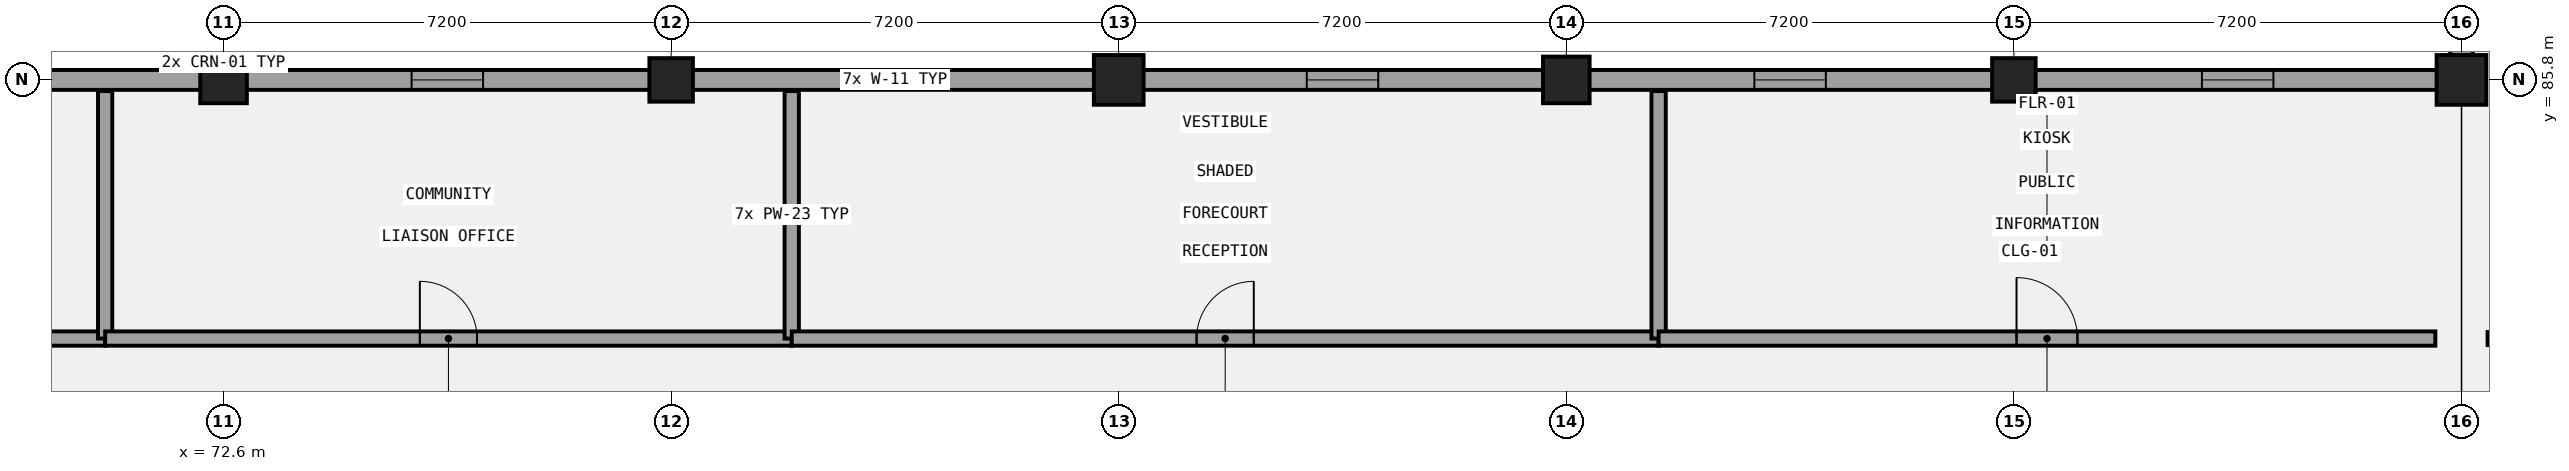
"""IFC4 building model, lengths in metres.
Left out: names, types, materials, properties, quantities, classifications, styles, units other than length and angle.
Written with IfcOpenShell. Run it as: python <this file> out.ifc"""

import sys

from ifc_helpers import new_model, si_unit, direction, frame, frame_2d, origin, origin_2d, place, context, subcontext, project, spatial, rectangle, extrude, element, fill, save


model = new_model("IFC4")
c1 = context("Model", 3, precision=1e-05, world=origin(), true_north=direction((0.0, 1.0)))
c2 = subcontext(c1, "Body", "Model", "MODEL_VIEW")
j1 = project(units=[si_unit("LENGTHUNIT", "METRE"), si_unit("PLANEANGLEUNIT", "RADIAN")], contexts=[c1])
p1 = place(None, origin())
s1 = spatial("IfcSite", under=j1, at=p1, CompositionType="ELEMENT")
p2 = place(p1, origin())
s2 = spatial("IfcBuilding", under=s1, at=p2, CompositionType="ELEMENT")
p3 = place(p2, origin())
s3 = spatial("IfcBuildingStorey", under=s2, at=p3, CompositionType="ELEMENT", Elevation=0.0)
p4 = place(p3, frame((72.6, 85.8, 0.0), z_axis=(0.0, 0.0, 1.0), x_axis=(1.0, 0.0, 0.0)))
e1 = element("IfcColumn", 1, at=p4, inside=s3, PredefinedType="COLUMN", context=c2, shape_type="SweptSolid", body=[
    extrude(rectangle(XDim=0.75, YDim=0.75, at=origin_2d()), origin(), (0.0, 0.0, 1.0), 5.4),
])
p5 = place(p3, frame((79.8, 85.8, 0.0), z_axis=(0.0, 0.0, 1.0), x_axis=(1.0, 0.0, 0.0)))
e2 = element("IfcColumn", 2, at=p5, inside=s3, PredefinedType="COLUMN", context=c2, shape_type="SweptSolid", body=[
    extrude(rectangle(XDim=0.7, YDim=0.7, at=origin_2d()), origin(), (0.0, 0.0, 1.0), 5.4),
])
p6 = place(p3, frame((87.0, 85.8, 0.0), z_axis=(0.0, 0.0, 1.0), x_axis=(1.0, 0.0, 0.0)))
e3 = element("IfcColumn", 3, at=p6, inside=s3, PredefinedType="COLUMN", context=c2, shape_type="SweptSolid", body=[
    extrude(rectangle(XDim=0.8, YDim=0.8, at=origin_2d()), origin(), (0.0, 0.0, 1.0), 5.4),
])
p7 = place(p3, frame((94.2, 85.8, 0.0), z_axis=(0.0, 0.0, 1.0), x_axis=(1.0, 0.0, 0.0)))
e4 = element("IfcColumn", 4, at=p7, inside=s3, PredefinedType="COLUMN", context=c2, shape_type="SweptSolid", body=[
    extrude(rectangle(XDim=0.75, YDim=0.75, at=origin_2d()), origin(), (0.0, 0.0, 1.0), 5.4),
])
p8 = place(p3, frame((101.4, 85.8, 0.0), z_axis=(0.0, 0.0, 1.0), x_axis=(1.0, 0.0, 0.0)))
e5 = element("IfcColumn", 5, at=p8, inside=s3, PredefinedType="COLUMN", context=c2, shape_type="SweptSolid", body=[
    extrude(rectangle(XDim=0.7, YDim=0.7, at=origin_2d()), origin(), (0.0, 0.0, 1.0), 5.4),
])
p9 = place(p3, frame((108.6, 85.8, 0.0), z_axis=(0.0, 0.0, 1.0), x_axis=(1.0, 0.0, 0.0)))
e6 = element("IfcColumn", 6, at=p9, inside=s3, PredefinedType="COLUMN", context=c2, shape_type="SweptSolid", body=[
    extrude(rectangle(XDim=0.8, YDim=0.8, at=origin_2d()), origin(), (0.0, 0.0, 1.0), 5.4),
])
p10 = place(p3, frame((108.6, 92.75, 0.0), z_axis=(0.0, 0.0, 1.0), x_axis=(0.0, -1.0, 0.0)))
e7 = element("IfcWall", 7, at=p10, inside=s3, PredefinedType="SOLIDWALL", context=c2, shape_type="SweptSolid", body=[
    extrude(rectangle(XDim=6.77, YDim=0.36, at=frame_2d((3.385, 0.0))), origin(), (0.0, 0.0, 1.0), 4.32),
])
p11 = place(p10, frame((2.96, 0.0, 0.95)))
e8 = element("IfcOpeningElement", 8, at=p11, cuts=e7, PredefinedType="OPENING", context=c2, shape_type="SweptSolid", body=[
    extrude(rectangle(XDim=0.85, YDim=1.4, at=frame_2d((0.425, 0.7))), frame((0.0, 0.19, 0.0), z_axis=(0.0, -1.0, 0.0), x_axis=(1.0, 0.0, 0.0)), (0.0, 0.0, 1.0), 0.38),
])
p12 = place(p3, frame((108.76, 85.8, 0.0), z_axis=(0.0, 0.0, 1.0), x_axis=(-1.0, 0.0, 0.0)))
e9 = element("IfcWall", 9, at=p12, inside=s3, PredefinedType="SOLIDWALL", context=c2, shape_type="SweptSolid", body=[
    extrude(rectangle(XDim=72.32, YDim=0.32, at=frame_2d((36.16, 0.0))), origin(), (0.0, 0.0, 1.0), 4.12),
])
p13 = place(p12, frame((67.985, 0.0, 1.0)))
e10 = element("IfcOpeningElement", 10, at=p13, cuts=e9, PredefinedType="OPENING", context=c2, shape_type="SweptSolid", body=[
    extrude(rectangle(XDim=1.15, YDim=1.4, at=frame_2d((0.575, 0.7))), frame((0.0, 0.17, 0.0), z_axis=(0.0, -1.0, 0.0), x_axis=(1.0, 0.0, 0.0)), (0.0, 0.0, 1.0), 0.34),
])
p14 = place(p12, frame((60.785, 0.0, 1.0)))
e11 = element("IfcOpeningElement", 11, at=p14, cuts=e9, PredefinedType="OPENING", context=c2, shape_type="SweptSolid", body=[
    extrude(rectangle(XDim=1.15, YDim=1.4, at=frame_2d((0.575, 0.7))), frame((0.0, 0.17, 0.0), z_axis=(0.0, -1.0, 0.0), x_axis=(1.0, 0.0, 0.0)), (0.0, 0.0, 1.0), 0.34),
])
p15 = place(p12, frame((53.585, 0.0, 1.0)))
e12 = element("IfcOpeningElement", 12, at=p15, cuts=e9, PredefinedType="OPENING", context=c2, shape_type="SweptSolid", body=[
    extrude(rectangle(XDim=1.15, YDim=1.4, at=frame_2d((0.575, 0.7))), frame((0.0, 0.17, 0.0), z_axis=(0.0, -1.0, 0.0), x_axis=(1.0, 0.0, 0.0)), (0.0, 0.0, 1.0), 0.34),
])
p16 = place(p12, frame((46.385, 0.0, 1.0)))
e13 = element("IfcOpeningElement", 13, at=p16, cuts=e9, PredefinedType="OPENING", context=c2, shape_type="SweptSolid", body=[
    extrude(rectangle(XDim=1.15, YDim=1.4, at=frame_2d((0.575, 0.7))), frame((0.0, 0.17, 0.0), z_axis=(0.0, -1.0, 0.0), x_axis=(1.0, 0.0, 0.0)), (0.0, 0.0, 1.0), 0.34),
])
p17 = place(p12, frame((39.185, 0.0, 1.0)))
e14 = element("IfcOpeningElement", 14, at=p17, cuts=e9, PredefinedType="OPENING", context=c2, shape_type="SweptSolid", body=[
    extrude(rectangle(XDim=1.15, YDim=1.4, at=frame_2d((0.575, 0.7))), frame((0.0, 0.17, 0.0), z_axis=(0.0, -1.0, 0.0), x_axis=(1.0, 0.0, 0.0)), (0.0, 0.0, 1.0), 0.34),
])
p18 = place(p12, frame((31.985, 0.0, 1.0)))
e15 = element("IfcOpeningElement", 15, at=p18, cuts=e9, PredefinedType="OPENING", context=c2, shape_type="SweptSolid", body=[
    extrude(rectangle(XDim=1.15, YDim=1.4, at=frame_2d((0.575, 0.7))), frame((0.0, 0.17, 0.0), z_axis=(0.0, -1.0, 0.0), x_axis=(1.0, 0.0, 0.0)), (0.0, 0.0, 1.0), 0.34),
])
p19 = place(p12, frame((24.785, 0.0, 1.0)))
e16 = element("IfcOpeningElement", 16, at=p19, cuts=e9, PredefinedType="OPENING", context=c2, shape_type="SweptSolid", body=[
    extrude(rectangle(XDim=1.15, YDim=1.4, at=frame_2d((0.575, 0.7))), frame((0.0, 0.17, 0.0), z_axis=(0.0, -1.0, 0.0), x_axis=(1.0, 0.0, 0.0)), (0.0, 0.0, 1.0), 0.34),
])
p20 = place(p12, frame((17.585, 0.0, 1.0)))
e17 = element("IfcOpeningElement", 17, at=p20, cuts=e9, PredefinedType="OPENING", context=c2, shape_type="SweptSolid", body=[
    extrude(rectangle(XDim=1.15, YDim=1.4, at=frame_2d((0.575, 0.7))), frame((0.0, 0.17, 0.0), z_axis=(0.0, -1.0, 0.0), x_axis=(1.0, 0.0, 0.0)), (0.0, 0.0, 1.0), 0.34),
])
p21 = place(p12, frame((10.385, 0.0, 1.0)))
e18 = element("IfcOpeningElement", 18, at=p21, cuts=e9, PredefinedType="OPENING", context=c2, shape_type="SweptSolid", body=[
    extrude(rectangle(XDim=1.15, YDim=1.4, at=frame_2d((0.575, 0.7))), frame((0.0, 0.17, 0.0), z_axis=(0.0, -1.0, 0.0), x_axis=(1.0, 0.0, 0.0)), (0.0, 0.0, 1.0), 0.34),
])
p22 = place(p12, frame((3.185, 0.0, 1.0)))
e19 = element("IfcOpeningElement", 19, at=p22, cuts=e9, PredefinedType="OPENING", context=c2, shape_type="SweptSolid", body=[
    extrude(rectangle(XDim=1.15, YDim=1.4, at=frame_2d((0.575, 0.7))), frame((0.0, 0.17, 0.0), z_axis=(0.0, -1.0, 0.0), x_axis=(1.0, 0.0, 0.0)), (0.0, 0.0, 1.0), 0.34),
])
p23 = place(p3, frame((109.02, 81.64, 0.0), z_axis=(0.0, 0.0, 1.0), x_axis=(1.0, 0.0, 0.0)))
e20 = element("IfcWall", 20, at=p23, inside=s3, PredefinedType="PARTITIONING", context=c2, shape_type="SweptSolid", body=[
    extrude(rectangle(XDim=5.427, YDim=0.21, at=frame_2d((2.713, 0.0))), origin(), (0.0, 0.0, 1.0), 5.12),
])
p24 = place(p23, frame((2.033, 0.0, 0.0)))
e21 = element("IfcOpeningElement", 21, at=p24, cuts=e20, PredefinedType="OPENING", context=c2, shape_type="SweptSolid", body=[
    extrude(rectangle(XDim=1.36, YDim=2.35, at=frame_2d((0.68, 1.175))), frame((0.0, 0.115, 0.0), z_axis=(0.0, -1.0, 0.0), x_axis=(1.0, 0.0, 0.0)), (0.0, 0.0, 1.0), 0.23),
])
p25 = place(p3, frame((58.2, 81.64, 0.0), z_axis=(0.0, 0.0, 1.0), x_axis=(1.0, 0.0, 0.0)))
e22 = element("IfcWall", 22, at=p25, inside=s3, PredefinedType="PARTITIONING", context=c2, shape_type="SweptSolid", body=[
    extrude(rectangle(XDim=12.495, YDim=0.23, at=frame_2d((6.248, 0.0))), origin(), (0.0, 0.0, 1.0), 5.12),
])
p26 = place(p25, frame((5.788, 0.0, 0.0)))
e23 = element("IfcOpeningElement", 23, at=p26, cuts=e22, PredefinedType="OPENING", context=c2, shape_type="SweptSolid", body=[
    extrude(rectangle(XDim=0.92, YDim=2.1, at=frame_2d((0.46, 1.05))), frame((0.0, 0.125, 0.0), z_axis=(0.0, -1.0, 0.0), x_axis=(1.0, 0.0, 0.0)), (0.0, 0.0, 1.0), 0.25),
])
p27 = place(p3, frame((70.695, 81.64, 0.0), z_axis=(0.0, 0.0, 1.0), x_axis=(0.0, 1.0, 0.0)))
e24 = element("IfcWall", 24, at=p27, inside=s3, PredefinedType="PARTITIONING", context=c2, shape_type="SweptSolid", body=[
    extrude(rectangle(XDim=3.98, YDim=0.23, at=frame_2d((1.99, 0.0))), origin(), (0.0, 0.0, 1.0), 5.12),
])
p28 = place(p3, frame((70.695, 81.64, 0.0), z_axis=(0.0, 0.0, 1.0), x_axis=(1.0, 0.0, 0.0)))
e25 = element("IfcWall", 25, at=p28, inside=s3, PredefinedType="PARTITIONING", context=c2, shape_type="SweptSolid", body=[
    extrude(rectangle(XDim=11.045, YDim=0.23, at=frame_2d((5.522, 0.0))), origin(), (0.0, 0.0, 1.0), 5.12),
])
p29 = place(p28, frame((5.062, 0.0, 0.0)))
e26 = element("IfcOpeningElement", 26, at=p29, cuts=e25, PredefinedType="OPENING", context=c2, shape_type="SweptSolid", body=[
    extrude(rectangle(XDim=0.92, YDim=2.22, at=frame_2d((0.46, 1.11))), frame((0.0, 0.125, 0.0), z_axis=(0.0, -1.0, 0.0), x_axis=(1.0, 0.0, 0.0)), (0.0, 0.0, 1.0), 0.25),
])
p30 = place(p3, frame((81.74, 81.64, 0.0), z_axis=(0.0, 0.0, 1.0), x_axis=(0.0, 1.0, 0.0)))
e27 = element("IfcWall", 27, at=p30, inside=s3, PredefinedType="PARTITIONING", context=c2, shape_type="SweptSolid", body=[
    extrude(rectangle(XDim=3.98, YDim=0.23, at=frame_2d((1.99, 0.0))), origin(), (0.0, 0.0, 1.0), 5.12),
])
p31 = place(p3, frame((81.74, 81.64, 0.0), z_axis=(0.0, 0.0, 1.0), x_axis=(1.0, 0.0, 0.0)))
e28 = element("IfcWall", 28, at=p31, inside=s3, PredefinedType="PARTITIONING", context=c2, shape_type="SweptSolid", body=[
    extrude(rectangle(XDim=13.945, YDim=0.23, at=frame_2d((6.973, 0.0))), origin(), (0.0, 0.0, 1.0), 5.12),
])
p32 = place(p31, frame((6.512, 0.0, 0.0)))
e29 = element("IfcOpeningElement", 29, at=p32, cuts=e28, PredefinedType="OPENING", context=c2, shape_type="SweptSolid", body=[
    extrude(rectangle(XDim=0.92, YDim=2.35, at=frame_2d((0.46, 1.175))), frame((0.0, 0.125, 0.0), z_axis=(0.0, -1.0, 0.0), x_axis=(1.0, 0.0, 0.0)), (0.0, 0.0, 1.0), 0.25),
])
p33 = place(p3, frame((95.685, 81.64, 0.0), z_axis=(0.0, 0.0, 1.0), x_axis=(0.0, 1.0, 0.0)))
e30 = element("IfcWall", 30, at=p33, inside=s3, PredefinedType="PARTITIONING", context=c2, shape_type="SweptSolid", body=[
    extrude(rectangle(XDim=3.98, YDim=0.23, at=frame_2d((1.99, 0.0))), origin(), (0.0, 0.0, 1.0), 5.12),
])
p34 = place(p3, frame((95.685, 81.64, 0.0), z_axis=(0.0, 0.0, 1.0), x_axis=(1.0, 0.0, 0.0)))
e31 = element("IfcWall", 31, at=p34, inside=s3, PredefinedType="PARTITIONING", context=c2, shape_type="SweptSolid", body=[
    extrude(rectangle(XDim=12.495, YDim=0.23, at=frame_2d((6.248, 0.0))), origin(), (0.0, 0.0, 1.0), 5.12),
])
p35 = place(p34, frame((5.758, 0.0, 0.0)))
e32 = element("IfcOpeningElement", 32, at=p35, cuts=e31, PredefinedType="OPENING", context=c2, shape_type="SweptSolid", body=[
    extrude(rectangle(XDim=0.98, YDim=2.1, at=frame_2d((0.49, 1.05))), frame((0.0, 0.125, 0.0), z_axis=(0.0, -1.0, 0.0), x_axis=(1.0, 0.0, 0.0)), (0.0, 0.0, 1.0), 0.25),
])
p36 = place(p18, origin())
e33 = element("IfcWindow", 33, at=p36, inside=s3, PartitioningType="SINGLE_PANEL", PredefinedType="WINDOW", context=c2, shape_type="SweptSolid", body=[
    extrude(rectangle(XDim=1.15, YDim=1.4, at=frame_2d((0.575, 0.7))), frame((0.0, 0.03, 0.0), z_axis=(0.0, -1.0, 0.0), x_axis=(1.0, 0.0, 0.0)), (0.0, 0.0, 1.0), 0.06),
])
fill(e15, e33)
p37 = place(p19, origin())
e34 = element("IfcWindow", 34, at=p37, inside=s3, PartitioningType="SINGLE_PANEL", PredefinedType="WINDOW", context=c2, shape_type="SweptSolid", body=[
    extrude(rectangle(XDim=1.15, YDim=1.4, at=frame_2d((0.575, 0.7))), frame((0.0, 0.03, 0.0), z_axis=(0.0, -1.0, 0.0), x_axis=(1.0, 0.0, 0.0)), (0.0, 0.0, 1.0), 0.06),
])
fill(e16, e34)
p38 = place(p20, origin())
e35 = element("IfcWindow", 35, at=p38, inside=s3, PartitioningType="SINGLE_PANEL", PredefinedType="WINDOW", context=c2, shape_type="SweptSolid", body=[
    extrude(rectangle(XDim=1.15, YDim=1.4, at=frame_2d((0.575, 0.7))), frame((0.0, 0.03, 0.0), z_axis=(0.0, -1.0, 0.0), x_axis=(1.0, 0.0, 0.0)), (0.0, 0.0, 1.0), 0.06),
])
fill(e17, e35)
p39 = place(p21, origin())
e36 = element("IfcWindow", 36, at=p39, inside=s3, PartitioningType="SINGLE_PANEL", PredefinedType="WINDOW", context=c2, shape_type="SweptSolid", body=[
    extrude(rectangle(XDim=1.15, YDim=1.4, at=frame_2d((0.575, 0.7))), frame((0.0, 0.03, 0.0), z_axis=(0.0, -1.0, 0.0), x_axis=(1.0, 0.0, 0.0)), (0.0, 0.0, 1.0), 0.06),
])
fill(e18, e36)
p40 = place(p22, origin())
e37 = element("IfcWindow", 37, at=p40, inside=s3, PartitioningType="SINGLE_PANEL", PredefinedType="WINDOW", context=c2, shape_type="SweptSolid", body=[
    extrude(rectangle(XDim=1.15, YDim=1.4, at=frame_2d((0.575, 0.7))), frame((0.0, 0.03, 0.0), z_axis=(0.0, -1.0, 0.0), x_axis=(1.0, 0.0, 0.0)), (0.0, 0.0, 1.0), 0.06),
])
fill(e19, e37)
p41 = place(p29, origin())
e38 = element("IfcDoor", 38, at=p41, inside=s3, OperationType="SINGLE_SWING_LEFT", PredefinedType="DOOR", context=c2, shape_type="SweptSolid", body=[
    extrude(rectangle(XDim=0.92, YDim=2.22, at=frame_2d((0.46, 1.11))), frame((0.0, 0.025, 0.0), z_axis=(0.0, -1.0, 0.0), x_axis=(1.0, 0.0, 0.0)), (0.0, 0.0, 1.0), 0.05),
])
fill(e26, e38)
p42 = place(p32, origin())
e39 = element("IfcDoor", 39, at=p42, inside=s3, OperationType="SINGLE_SWING_RIGHT", PredefinedType="DOOR", context=c2, shape_type="SweptSolid", body=[
    extrude(rectangle(XDim=0.92, YDim=2.35, at=frame_2d((0.46, 1.175))), frame((0.0, 0.025, 0.0), z_axis=(0.0, -1.0, 0.0), x_axis=(1.0, 0.0, 0.0)), (0.0, 0.0, 1.0), 0.05),
])
fill(e29, e39)
p43 = place(p35, origin())
e40 = element("IfcDoor", 40, at=p43, inside=s3, OperationType="SINGLE_SWING_LEFT", PredefinedType="DOOR", context=c2, shape_type="SweptSolid", body=[
    extrude(rectangle(XDim=0.98, YDim=2.1, at=frame_2d((0.49, 1.05))), frame((0.0, 0.025, 0.0), z_axis=(0.0, -1.0, 0.0), x_axis=(1.0, 0.0, 0.0)), (0.0, 0.0, 1.0), 0.05),
])
fill(e32, e40)
save(model, sys.argv[1])
